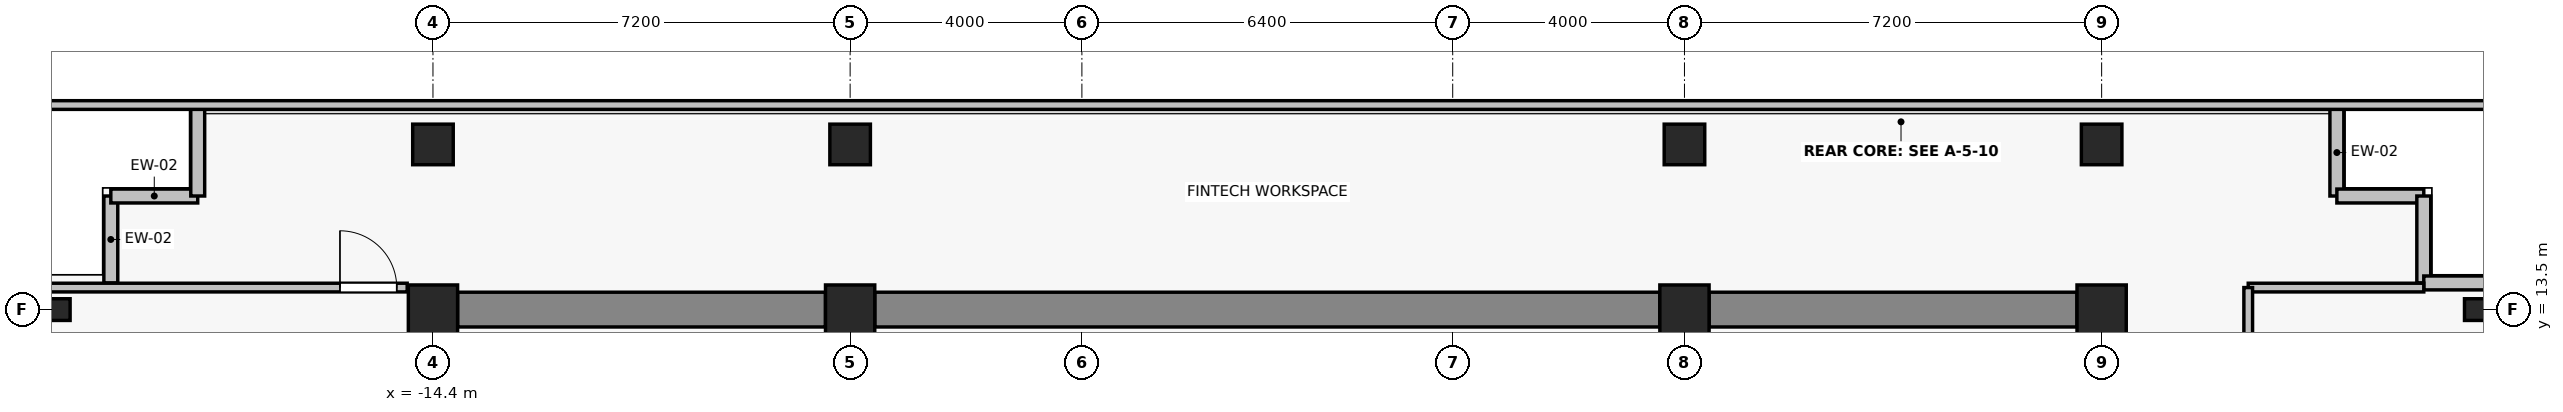
"""IFC4 building model, lengths in metres.
Left out: names, types, materials, properties, quantities, classifications, styles, units other than length and angle.
Written with IfcOpenShell. Run it as: python <this file> out.ifc"""

import sys

from ifc_helpers import new_model, si_unit, direction, frame, frame_2d, origin, origin_2d, place, context, subcontext, project, spatial, rectangle, i_section, extrude, source, transform, mapped, element, fill, save


model = new_model("IFC4")
c1 = context("Model", 3, precision=1e-05, world=origin(), true_north=direction((0.0, 1.0)))
c2 = subcontext(c1, "Body", "Model", "MODEL_VIEW")
j1 = project(units=[si_unit("LENGTHUNIT", "METRE"), si_unit("PLANEANGLEUNIT", "RADIAN")], contexts=[c1])
p1 = place(None, origin())
s1 = spatial("IfcSite", under=j1, at=p1, CompositionType="ELEMENT")
p2 = place(p1, origin())
s2 = spatial("IfcBuilding", under=s1, at=p2, CompositionType="ELEMENT")
p3 = place(p2, frame((0.0, 0.0, 265.0)))
s3 = spatial("IfcBuildingStorey", under=s2, at=p3, CompositionType="ELEMENT", Elevation=265.0)
for number, where, z_axis, x_axis in (
    (1, (-14.4, 13.5, 0.0), (0.0, 0.0, 1.0), (1.0, 0.0, 0.0)),
    (2, (-7.2, 13.5, 0.0), (0.0, 0.0, 1.0), (1.0, 0.0, 0.0)),
    (3, (7.2, 13.5, 0.0), (0.0, 0.0, 1.0), (1.0, 0.0, 0.0)),
    (4, (14.4, 13.5, 0.0), (0.0, 0.0, 1.0), (1.0, 0.0, 0.0)),
):
    element("IfcColumn", number, at=place(p3, frame(where, z_axis=z_axis, x_axis=x_axis)), inside=s3, PredefinedType="COLUMN", context=c2, shape_type="SweptSolid", body=[
        extrude(rectangle(XDim=0.85, YDim=0.85, at=origin_2d()), origin(), (0.0, 0.0, 1.0), 3.3),
    ])
for number, where, z_axis, x_axis in (
    (5, (-14.4, 16.35, 0.0), (0.0, 0.0, 1.0), (1.0, 0.0, 0.0)),
    (6, (-7.2, 16.35, 0.0), (0.0, 0.0, 1.0), (1.0, 0.0, 0.0)),
    (7, (7.2, 16.35, 0.0), (0.0, 0.0, 1.0), (1.0, 0.0, 0.0)),
    (8, (14.4, 16.35, 0.0), (0.0, 0.0, 1.0), (1.0, 0.0, 0.0)),
):
    element("IfcColumn", number, at=place(p3, frame(where, z_axis=z_axis, x_axis=x_axis)), inside=s3, PredefinedType="COLUMN", context=c2, shape_type="SweptSolid", body=[
        extrude(rectangle(XDim=0.7, YDim=0.7, at=origin_2d()), origin(), (0.0, 0.0, 1.0), 3.3),
    ])
for number, where, z_axis, x_axis in (
    (9, (-20.85, 13.5, 0.0), (0.0, 0.0, 1.0), (1.0, 0.0, 0.0)),
    (10, (20.85, 13.5, 0.0), (0.0, 0.0, 1.0), (1.0, 0.0, 0.0)),
):
    element("IfcColumn", number, at=place(p3, frame(where, z_axis=z_axis, x_axis=x_axis)), inside=s3, PredefinedType="COLUMN", context=c2, shape_type="SweptSolid", body=[
        extrude(i_section(OverallWidth=0.375, OverallDepth=0.375, WebThickness=0.017, FlangeThickness=0.027, FilletRadius=0.015, at=origin_2d()), origin(), (0.0, 0.0, 1.0), 3.3),
    ])
p4 = place(p3, frame((-13.975, 13.5, 0.0), z_axis=(0.0, 0.0, 1.0), x_axis=(1.0, 0.0, 0.0)))
e11 = element("IfcWall", 11, at=p4, inside=s3, PredefinedType="SHEAR", context=c2, shape_type="SweptSolid", body=[
    extrude(rectangle(XDim=6.35, YDim=0.6, at=frame_2d((3.175, 0.0))), origin(), (0.0, 0.0, 1.0), 3.075),
])
p5 = place(p3, frame((-6.775, 13.5, 0.0), z_axis=(0.0, 0.0, 1.0), x_axis=(1.0, 0.0, 0.0)))
e12 = element("IfcWall", 12, at=p5, inside=s3, PredefinedType="SHEAR", context=c2, shape_type="SweptSolid", body=[
    extrude(rectangle(XDim=13.55, YDim=0.6, at=frame_2d((6.775, 0.0))), origin(), (0.0, 0.0, 1.0), 3.075),
])
p6 = place(p3, frame((7.625, 13.5, 0.0), z_axis=(0.0, 0.0, 1.0), x_axis=(1.0, 0.0, 0.0)))
e13 = element("IfcWall", 13, at=p6, inside=s3, PredefinedType="SHEAR", context=c2, shape_type="SweptSolid", body=[
    extrude(rectangle(XDim=6.35, YDim=0.6, at=frame_2d((3.175, 0.0))), origin(), (0.0, 0.0, 1.0), 3.075),
])
for number, where, z_axis, x_axis in (
    (14, (-19.96, 15.46, 0.0), (0.0, 0.0, 1.0), (0.0, -1.0, 0.0)),
    (15, (-18.46, 15.46, 0.0), (0.0, 0.0, 1.0), (-1.0, 0.0, 0.0)),
    (16, (-18.46, 16.96, 0.0), (0.0, 0.0, 1.0), (0.0, -1.0, 0.0)),
    (17, (18.46, 15.46, 0.0), (0.0, 0.0, 1.0), (0.0, 1.0, 0.0)),
    (18, (19.96, 15.46, 0.0), (0.0, 0.0, 1.0), (-1.0, 0.0, 0.0)),
    (19, (19.96, 13.96, 0.0), (0.0, 0.0, 1.0), (0.0, 1.0, 0.0)),
    (20, (21.46, 13.96, 0.0), (0.0, 0.0, 1.0), (-1.0, 0.0, 0.0)),
):
    element("IfcWall", number, at=place(p3, frame(where, z_axis=z_axis, x_axis=x_axis)), inside=s3, PredefinedType="SOLIDWALL", context=c2, shape_type="SweptSolid", body=[
        extrude(rectangle(XDim=1.5, YDim=0.24, at=frame_2d((0.75, 0.0))), origin(), (0.0, 0.0, 1.0), 3.075),
    ])
p7 = place(p3, frame((-21.53, 13.88, 0.0), z_axis=(0.0, 0.0, 1.0), x_axis=(1.0, 0.0, 0.0)))
e21 = element("IfcWall", 21, at=p7, inside=s3, PredefinedType="PARTITIONING", context=c2, shape_type="SweptSolid", body=[
    extrude(rectangle(XDim=6.685, YDim=0.15, at=frame_2d((3.343, 0.0))), origin(), (0.0, 0.0, 1.0), 3.075),
])
p8 = place(p7, frame((5.525, 0.0, 0.0)))
e22 = element("IfcOpeningElement", 22, at=p8, cuts=e21, PredefinedType="OPENING", context=c2, shape_type="SweptSolid", body=[
    extrude(rectangle(XDim=0.98, YDim=2.15, at=frame_2d((0.49, 1.075))), frame((0.0, 0.085, 0.0), z_axis=(0.0, -1.0, 0.0), x_axis=(1.0, 0.0, 0.0)), (0.0, 0.0, 1.0), 0.17),
])
p9 = place(p3, frame((16.93, 13.88, 0.0), z_axis=(0.0, 0.0, 1.0), x_axis=(1.0, 0.0, 0.0)))
e23 = element("IfcWall", 23, at=p9, inside=s3, PredefinedType="PARTITIONING", context=c2, shape_type="SweptSolid", body=[
    extrude(rectangle(XDim=3.03, YDim=0.15, at=frame_2d((1.515, 0.0))), origin(), (0.0, 0.0, 1.0), 3.075),
])
p10 = place(p3, frame((16.93, -1.77, 0.0), z_axis=(0.0, 0.0, 1.0), x_axis=(0.0, 1.0, 0.0)))
e24 = element("IfcWall", 24, at=p10, inside=s3, PredefinedType="PARTITIONING", context=c2, shape_type="SweptSolid", body=[
    extrude(rectangle(XDim=15.65, YDim=0.15, at=frame_2d((7.825, 0.0))), origin(), (0.0, 0.0, 1.0), 2.615),
])
p11 = place(p10, frame((7.335, 0.0, 0.0)))
e25 = element("IfcOpeningElement", 25, at=p11, cuts=e24, PredefinedType="OPENING", context=c2, shape_type="SweptSolid", body=[
    extrude(rectangle(XDim=0.98, YDim=2.15, at=frame_2d((0.49, 1.075))), frame((0.0, 0.085, 0.0), z_axis=(0.0, -1.0, 0.0), x_axis=(1.0, 0.0, 0.0)), (0.0, 0.0, 1.0), 0.17),
])
p12 = place(p3, frame((-21.53, 17.03, 0.0), z_axis=(0.0, 0.0, 1.0), x_axis=(1.0, 0.0, 0.0)))
e26 = element("IfcWall", 26, at=p12, inside=s3, PredefinedType="PARTITIONING", context=c2, shape_type="SweptSolid", body=[
    extrude(rectangle(XDim=43.06, YDim=0.15, at=frame_2d((21.53, 0.0))), origin(), (0.0, 0.0, 1.0), 3.075),
])
m1 = source(origin(), c2, "Body", "SweptSolid", [
    extrude(rectangle(XDim=0.98, YDim=2.15, at=frame_2d((0.49, 1.075))), frame((0.0, 0.025, 0.0), z_axis=(0.0, -1.0, 0.0), x_axis=(1.0, 0.0, 0.0)), (0.0, 0.0, 1.0), 0.05),
])
p13 = place(p8, origin())
e27 = element("IfcDoor", 27, at=p13, inside=s3, OperationType="SINGLE_SWING_LEFT", PredefinedType="DOOR", context=c2, shape_type="MappedRepresentation", body=[
    mapped(m1, transform((0.0, 0.0, 0.0), x_axis=(1.0, 0.0, 0.0), y_axis=(0.0, 1.0, 0.0), z_axis=(0.0, 0.0, 1.0), scale=1.0)),
])
fill(e22, e27)
save(model, sys.argv[1])
